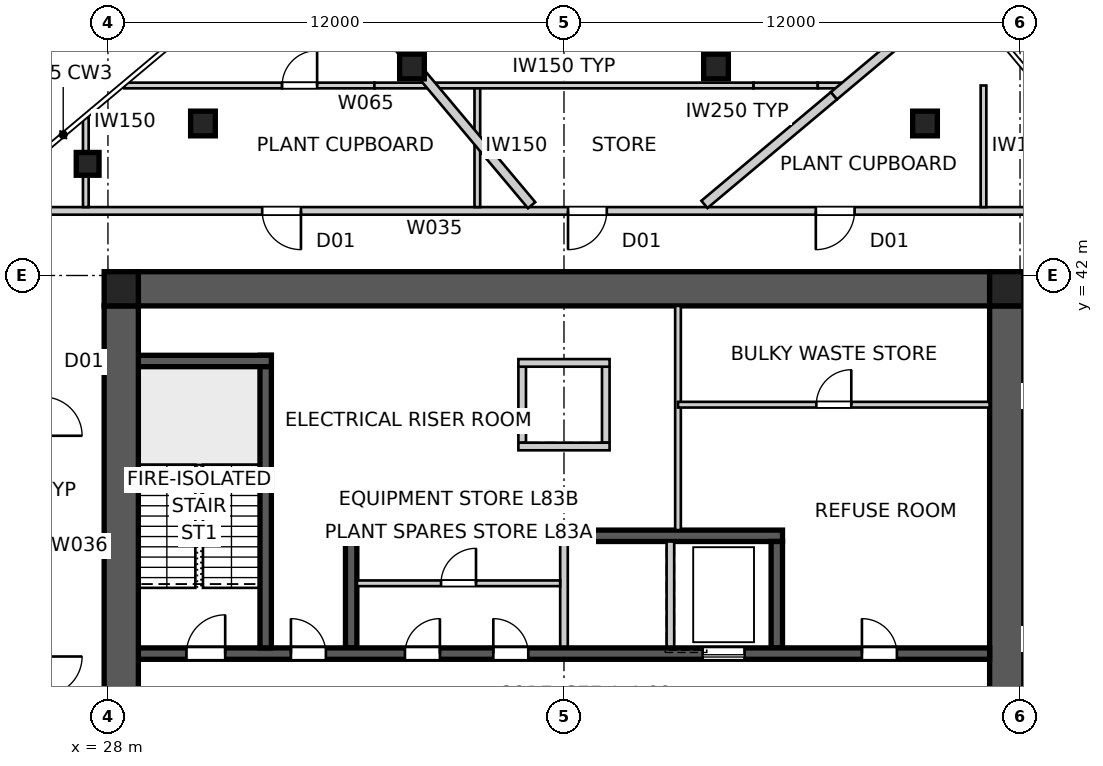
"""IFC4 building model, lengths in metres.
Left out: names, types, materials, properties, quantities, classifications, styles, units other than length and angle.
Written with IfcOpenShell. Run it as: python <this file> out.ifc"""

import sys

from ifc_helpers import new_model, si_unit, direction, frame, frame_2d, origin, origin_2d, place, context, subcontext, project, spatial, polyline, rectangle, outline, extrude, element, fill, save


model = new_model("IFC4")
c1 = context("Model", 3, precision=1e-05, world=origin(), true_north=direction((0.0, 1.0)))
c2 = subcontext(c1, "Body", "Model", "MODEL_VIEW")
j1 = project(units=[si_unit("LENGTHUNIT", "METRE"), si_unit("PLANEANGLEUNIT", "RADIAN")], contexts=[c1])
p1 = place(None, origin())
s1 = spatial("IfcSite", under=j1, at=p1, CompositionType="ELEMENT")
p2 = place(p1, origin())
s2 = spatial("IfcBuilding", under=s1, at=p2, CompositionType="ELEMENT")
p3 = place(p2, frame((0.0, 0.0, 299.8)))
s3 = spatial("IfcBuildingStorey", under=s2, at=p3, CompositionType="ELEMENT", Elevation=299.8)
p4 = place(p3, frame((28.8, 41.65, 0.0), z_axis=(0.0, 0.0, 1.0), x_axis=(1.0, 0.0, 0.0)))
e1 = element("IfcWall", 1, at=p4, inside=s3, PredefinedType="SHEAR", context=c2, shape_type="SweptSolid", body=[
    extrude(outline(polyline([(0.0, -0.45), (22.4, -0.45), (22.4, -0.025), (22.85, -0.025), (22.85, 0.025), (22.4, 0.025), (22.4, 0.45), (0.0, 0.45), (0.0, 0.025), (-0.45, 0.025), (-0.45, -0.025), (0.0, -0.025), (0.0, -0.45)])), origin(), (0.0, 0.0, 1.0), 4.5),
])
p5 = place(p3, frame((51.65, 18.8, 0.0), z_axis=(0.0, 0.0, 1.0), x_axis=(0.0, 1.0, 0.0)))
e2 = element("IfcWall", 2, at=p5, inside=s3, PredefinedType="SHEAR", context=c2, shape_type="SweptSolid", body=[
    extrude(outline(polyline([(0.0, -0.45), (22.4, -0.45), (22.4, -0.025), (22.85, -0.025), (22.85, 0.025), (22.4, 0.025), (22.4, 0.45), (0.0, 0.45), (0.0, 0.025), (-0.45, 0.025), (-0.45, -0.025), (0.0, -0.025), (0.0, -0.45)])), origin(), (0.0, 0.0, 1.0), 4.5),
])
p6 = place(p5, frame((11.14, 0.0, 0.0)))
e3 = element("IfcOpeningElement", 3, at=p6, cuts=e2, PredefinedType="OPENING", context=c2, shape_type="SweptSolid", body=[
    extrude(rectangle(XDim=1.02, YDim=2.4, at=frame_2d((0.51, 1.2))), frame((0.0, 0.46, 0.0), z_axis=(0.0, -1.0, 0.0), x_axis=(1.0, 0.0, 0.0)), (0.0, 0.0, 1.0), 0.92),
])
p7 = place(p3, frame((28.35, 41.2, 0.0), z_axis=(0.0, 0.0, 1.0), x_axis=(0.0, -1.0, 0.0)))
e4 = element("IfcWall", 4, at=p7, inside=s3, PredefinedType="SHEAR", context=c2, shape_type="SweptSolid", body=[
    extrude(outline(polyline([(0.0, -0.45), (22.4, -0.45), (22.4, -0.025), (22.85, -0.025), (22.85, 0.025), (22.4, 0.025), (22.4, 0.45), (0.0, 0.45), (0.0, 0.025), (-0.45, 0.025), (-0.45, -0.025), (0.0, -0.025), (0.0, -0.45)])), origin(), (0.0, 0.0, 1.0), 4.5),
])
p8 = place(p7, frame((11.14, 0.0, 0.0)))
e5 = element("IfcOpeningElement", 5, at=p8, cuts=e4, PredefinedType="OPENING", context=c2, shape_type="SweptSolid", body=[
    extrude(rectangle(XDim=1.02, YDim=2.4, at=frame_2d((0.51, 1.2))), frame((0.0, 0.46, 0.0), z_axis=(0.0, -1.0, 0.0), x_axis=(1.0, 0.0, 0.0)), (0.0, 0.0, 1.0), 0.92),
])
p9 = place(p3, frame((28.8, 32.05, 0.0), z_axis=(0.0, 0.0, 1.0), x_axis=(1.0, 0.0, 0.0)))
e6 = element("IfcWall", 6, at=p9, inside=s3, PredefinedType="SHEAR", context=c2, shape_type="SweptSolid", body=[
    extrude(rectangle(XDim=22.4, YDim=0.3, at=frame_2d((11.2, 0.0))), origin(), (0.0, 0.0, 1.0), 4.5),
])
p10 = place(p9, frame((19.04, 0.0, 0.0)))
e7 = element("IfcOpeningElement", 7, at=p10, cuts=e6, PredefinedType="OPENING", context=c2, shape_type="SweptSolid", body=[
    extrude(rectangle(XDim=0.92, YDim=2.1, at=frame_2d((0.46, 1.05))), frame((0.0, 0.16, 0.0), z_axis=(0.0, -1.0, 0.0), x_axis=(1.0, 0.0, 0.0)), (0.0, 0.0, 1.0), 0.32),
])
p11 = place(p9, frame((1.265, 0.0, 0.0)))
e8 = element("IfcOpeningElement", 8, at=p11, cuts=e6, PredefinedType="OPENING", context=c2, shape_type="SweptSolid", body=[
    extrude(rectangle(XDim=1.02, YDim=2.1, at=frame_2d((0.51, 1.05))), frame((0.0, 0.16, 0.0), z_axis=(0.0, -1.0, 0.0), x_axis=(1.0, 0.0, 0.0)), (0.0, 0.0, 1.0), 0.32),
])
p12 = place(p9, frame((4.015, 0.0, 0.0)))
e9 = element("IfcOpeningElement", 9, at=p12, cuts=e6, PredefinedType="OPENING", context=c2, shape_type="SweptSolid", body=[
    extrude(rectangle(XDim=0.92, YDim=2.1, at=frame_2d((0.46, 1.05))), frame((0.0, 0.16, 0.0), z_axis=(0.0, -1.0, 0.0), x_axis=(1.0, 0.0, 0.0)), (0.0, 0.0, 1.0), 0.32),
])
p13 = place(p9, frame((7.015, 0.0, 0.0)))
e10 = element("IfcOpeningElement", 10, at=p13, cuts=e6, PredefinedType="OPENING", context=c2, shape_type="SweptSolid", body=[
    extrude(rectangle(XDim=0.92, YDim=2.1, at=frame_2d((0.46, 1.05))), frame((0.0, 0.16, 0.0), z_axis=(0.0, -1.0, 0.0), x_axis=(1.0, 0.0, 0.0)), (0.0, 0.0, 1.0), 0.32),
])
p14 = place(p9, frame((9.34, 0.0, 0.0)))
e11 = element("IfcOpeningElement", 11, at=p14, cuts=e6, PredefinedType="OPENING", context=c2, shape_type="SweptSolid", body=[
    extrude(rectangle(XDim=0.92, YDim=2.1, at=frame_2d((0.46, 1.05))), frame((0.0, 0.16, 0.0), z_axis=(0.0, -1.0, 0.0), x_axis=(1.0, 0.0, 0.0)), (0.0, 0.0, 1.0), 0.32),
])
p15 = place(p9, frame((14.85, 0.0, 0.0)))
e12 = element("IfcOpeningElement", 12, at=p15, cuts=e6, PredefinedType="OPENING", context=c2, shape_type="SweptSolid", body=[
    extrude(rectangle(XDim=1.1, YDim=2.1, at=frame_2d((0.55, 1.05))), frame((0.0, 0.16, 0.0), z_axis=(0.0, -1.0, 0.0), x_axis=(1.0, 0.0, 0.0)), (0.0, 0.0, 1.0), 0.32),
])
p16 = place(p3, frame((34.25, 35.15, 0.0), z_axis=(0.0, 0.0, 1.0), x_axis=(1.0, 0.0, 0.0)))
e13 = element("IfcWall", 13, at=p16, inside=s3, PredefinedType="SHEAR", context=c2, shape_type="SweptSolid", body=[
    extrude(rectangle(XDim=11.5, YDim=0.3, at=frame_2d((5.75, 0.0))), origin(), (0.0, 0.0, 1.0), 4.5),
])
p17 = place(p3, frame((34.4, 32.2, 0.0), z_axis=(0.0, 0.0, 1.0), x_axis=(0.0, 1.0, 0.0)))
e14 = element("IfcWall", 14, at=p17, inside=s3, PredefinedType="SHEAR", context=c2, shape_type="SweptSolid", body=[
    extrude(rectangle(XDim=2.8, YDim=0.3, at=frame_2d((1.4, 0.0))), origin(), (0.0, 0.0, 1.0), 4.5),
])
for number, where, z_axis, x_axis in (
    (15, (40.0, 32.2, 0.0), (0.0, 0.0, 1.0), (0.0, 1.0, 0.0)),
    (16, (42.8, 32.2, 0.0), (0.0, 0.0, 1.0), (0.0, 1.0, 0.0)),
):
    element("IfcWall", number, at=place(p3, frame(where, z_axis=z_axis, x_axis=x_axis)), inside=s3, PredefinedType="SOLIDWALL", context=c2, shape_type="SweptSolid", body=[
        extrude(rectangle(XDim=2.8, YDim=0.2, at=frame_2d((1.4, 0.0))), origin(), (0.0, 0.0, 1.0), 4.5),
    ])
p18 = place(p3, frame((45.6, 32.2, 0.0), z_axis=(0.0, 0.0, 1.0), x_axis=(0.0, 1.0, 0.0)))
e17 = element("IfcWall", 17, at=p18, inside=s3, PredefinedType="SHEAR", context=c2, shape_type="SweptSolid", body=[
    extrude(rectangle(XDim=2.8, YDim=0.3, at=frame_2d((1.4, 0.0))), origin(), (0.0, 0.0, 1.0), 4.5),
])
p19 = place(p3, frame((32.15, 32.2, 0.0), z_axis=(0.0, 0.0, 1.0), x_axis=(0.0, 1.0, 0.0)))
e18 = element("IfcWall", 18, at=p19, inside=s3, PredefinedType="SHEAR", context=c2, shape_type="SweptSolid", body=[
    extrude(rectangle(XDim=7.7, YDim=0.3, at=frame_2d((3.85, 0.0))), origin(), (0.0, 0.0, 1.0), 4.5),
])
p20 = place(p3, frame((28.8, 39.75, 0.0), z_axis=(0.0, 0.0, 1.0), x_axis=(1.0, 0.0, 0.0)))
e19 = element("IfcWall", 19, at=p20, inside=s3, PredefinedType="SHEAR", context=c2, shape_type="SweptSolid", body=[
    extrude(rectangle(XDim=3.5, YDim=0.3, at=frame_2d((1.75, 0.0))), origin(), (0.0, 0.0, 1.0), 4.5),
])
for number, where, z_axis, x_axis in (
    (20, (38.9, 37.6, 0.0), (0.0, 0.0, 1.0), (0.0, 1.0, 0.0)),
    (21, (41.1, 37.6, 0.0), (0.0, 0.0, 1.0), (0.0, 1.0, 0.0)),
):
    element("IfcWall", number, at=place(p3, frame(where, z_axis=z_axis, x_axis=x_axis)), inside=s3, PredefinedType="SOLIDWALL", context=c2, shape_type="SweptSolid", body=[
        extrude(rectangle(XDim=2.0, YDim=0.2, at=frame_2d((1.0, 0.0))), origin(), (0.0, 0.0, 1.0), 4.5),
    ])
for number, where, z_axis, x_axis in (
    (22, (38.8, 37.5, 0.0), (0.0, 0.0, 1.0), (1.0, 0.0, 0.0)),
    (23, (38.8, 39.7, 0.0), (0.0, 0.0, 1.0), (1.0, 0.0, 0.0)),
):
    element("IfcWall", number, at=place(p3, frame(where, z_axis=z_axis, x_axis=x_axis)), inside=s3, PredefinedType="SOLIDWALL", context=c2, shape_type="SweptSolid", body=[
        extrude(rectangle(XDim=2.4, YDim=0.2, at=frame_2d((1.2, 0.0))), origin(), (0.0, 0.0, 1.0), 4.5),
    ])
for number, where, z_axis, x_axis in (
    (24, (51.65, 41.65, 0.0), (0.0, 0.0, 1.0), (1.0, 0.0, 0.0)),
    (25, (28.35, 41.65, 0.0), (0.0, 0.0, 1.0), (1.0, 0.0, 0.0)),
):
    element("IfcColumn", number, at=place(p3, frame(where, z_axis=z_axis, x_axis=x_axis)), inside=s3, PredefinedType="COLUMN", context=c2, shape_type="SweptSolid", body=[
        extrude(rectangle(XDim=0.9, YDim=0.9, at=origin_2d()), origin(), (0.0, 0.0, 1.0), 4.5),
    ])
p21 = place(p3, frame((27.466, 44.938, 0.0), z_axis=(0.0, 0.0, 1.0), x_axis=(1.0, 0.0, 0.0)))
e26 = element("IfcColumn", 26, at=p21, inside=s3, PredefinedType="COLUMN", context=c2, shape_type="SweptSolid", body=[
    extrude(rectangle(XDim=0.6, YDim=0.6, at=origin_2d()), origin(), (0.0, 0.0, 1.0), 4.5),
])
for number, where, z_axis, x_axis in (
    (27, (49.5, 46.0, 0.0), (0.0, 0.0, 1.0), (1.0, 0.0, 0.0)),
    (28, (44.0, 47.5, 0.0), (0.0, 0.0, 1.0), (1.0, 0.0, 0.0)),
    (29, (36.0, 47.5, 0.0), (0.0, 0.0, 1.0), (1.0, 0.0, 0.0)),
    (30, (30.5, 46.0, 0.0), (0.0, 0.0, 1.0), (1.0, 0.0, 0.0)),
):
    element("IfcColumn", number, at=place(p3, frame(where, z_axis=z_axis, x_axis=x_axis)), inside=s3, PredefinedType="COLUMN", context=c2, shape_type="SweptSolid", body=[
        extrude(rectangle(XDim=0.65, YDim=0.65, at=origin_2d()), origin(), (0.0, 0.0, 1.0), 4.5),
    ])
p22 = place(p3, frame((53.7, 43.7, 0.0), z_axis=(0.0, 0.0, 1.0), x_axis=(-1.0, 0.0, 0.0)))
e31 = element("IfcWall", 31, at=p22, inside=s3, PredefinedType="PARTITIONING", context=c2, shape_type="SweptSolid", body=[
    extrude(rectangle(XDim=27.4, YDim=0.2, at=frame_2d((13.7, 0.0))), origin(), (0.0, 0.0, 1.0), 4.3),
])
p23 = place(p22, frame((20.621, 0.0, 0.0)))
e32 = element("IfcOpeningElement", 32, at=p23, cuts=e31, PredefinedType="OPENING", context=c2, shape_type="SweptSolid", body=[
    extrude(rectangle(XDim=1.02, YDim=2.34, at=frame_2d((0.51, 1.17))), frame((0.0, 0.11, 0.0), z_axis=(0.0, -1.0, 0.0), x_axis=(1.0, 0.0, 0.0)), (0.0, 0.0, 1.0), 0.22),
])
p24 = place(p22, frame((6.053, 0.0, 0.0)))
e33 = element("IfcOpeningElement", 33, at=p24, cuts=e31, PredefinedType="OPENING", context=c2, shape_type="SweptSolid", body=[
    extrude(rectangle(XDim=1.02, YDim=2.34, at=frame_2d((0.51, 1.17))), frame((0.0, 0.11, 0.0), z_axis=(0.0, -1.0, 0.0), x_axis=(1.0, 0.0, 0.0)), (0.0, 0.0, 1.0), 0.22),
])
p25 = place(p22, frame((12.574, 0.0, 0.0)))
e34 = element("IfcOpeningElement", 34, at=p25, cuts=e31, PredefinedType="OPENING", context=c2, shape_type="SweptSolid", body=[
    extrude(rectangle(XDim=1.02, YDim=2.34, at=frame_2d((0.51, 1.17))), frame((0.0, 0.11, 0.0), z_axis=(0.0, -1.0, 0.0), x_axis=(1.0, 0.0, 0.0)), (0.0, 0.0, 1.0), 0.22),
])
p26 = place(p3, frame((49.635, 48.854, 0.0), z_axis=(0.0, 0.0, 1.0), x_axis=(-0.766014492995, -0.642823301165, 0.0)))
e35 = element("IfcWall", 35, at=p26, inside=s3, PredefinedType="PARTITIONING", context=c2, shape_type="SweptSolid", body=[
    extrude(rectangle(XDim=3.308, YDim=0.25, at=frame_2d((1.654, 0.0))), origin(), (0.0, 0.0, 1.0), 3.688),
])
p27 = place(p3, frame((47.101, 46.728, 0.0), z_axis=(0.0, 0.0, 1.0), x_axis=(-0.766051985436, -0.642778620996, 0.0)))
e36 = element("IfcWall", 36, at=p27, inside=s3, PredefinedType="PARTITIONING", context=c2, shape_type="SweptSolid", body=[
    extrude(rectangle(XDim=4.446, YDim=0.25, at=frame_2d((2.223, 0.0))), origin(), (0.0, 0.0, 1.0), 4.3),
])
p28 = place(p3, frame((33.143, 51.007, 0.0), z_axis=(0.0, 0.0, 1.0), x_axis=(0.64278692291, -0.766045019392, 0.0)))
e37 = element("IfcWall", 37, at=p28, inside=s3, PredefinedType="PARTITIONING", context=c2, shape_type="SweptSolid", body=[
    extrude(rectangle(XDim=9.343, YDim=0.25, at=frame_2d((4.671, 0.0))), origin(), (0.0, 0.0, 1.0), 4.3),
])
p29 = place(p3, frame((43.0, 41.2, 0.0), z_axis=(0.0, 0.0, 1.0), x_axis=(0.0, -1.0, 0.0)))
e38 = element("IfcWall", 38, at=p29, inside=s3, PredefinedType="SOLIDWALL", context=c2, shape_type="SweptSolid", body=[
    extrude(rectangle(XDim=5.9, YDim=0.15, at=frame_2d((2.95, 0.0))), origin(), (0.0, 0.0, 1.0), 4.3),
])
p30 = place(p3, frame((43.0, 38.6, 0.0), z_axis=(0.0, 0.0, 1.0), x_axis=(1.0, 0.0, 0.0)))
e39 = element("IfcWall", 39, at=p30, inside=s3, PredefinedType="SOLIDWALL", context=c2, shape_type="SweptSolid", body=[
    extrude(rectangle(XDim=8.2, YDim=0.15, at=frame_2d((4.1, 0.0))), origin(), (0.0, 0.0, 1.0), 4.3),
])
p31 = place(p30, frame((3.64, 0.0, 0.0)))
e40 = element("IfcOpeningElement", 40, at=p31, cuts=e39, PredefinedType="OPENING", context=c2, shape_type="SweptSolid", body=[
    extrude(rectangle(XDim=0.92, YDim=2.1, at=frame_2d((0.46, 1.05))), frame((0.0, 0.085, 0.0), z_axis=(0.0, -1.0, 0.0), x_axis=(1.0, 0.0, 0.0)), (0.0, 0.0, 1.0), 0.17),
])
p32 = place(p3, frame((51.039, 43.8, 0.0), z_axis=(0.0, 0.0, 1.0), x_axis=(0.0, 1.0, 0.0)))
e41 = element("IfcWall", 41, at=p32, inside=s3, PredefinedType="SOLIDWALL", context=c2, shape_type="SweptSolid", body=[
    extrude(rectangle(XDim=3.2, YDim=0.15, at=frame_2d((1.6, 0.0))), origin(), (0.0, 0.0, 1.0), 4.3),
])
p33 = place(p3, frame((27.417, 46.15, 0.0), z_axis=(0.0, 0.0, 1.0), x_axis=(0.0, -1.0, 0.0)))
e42 = element("IfcWall", 42, at=p33, inside=s3, PredefinedType="SOLIDWALL", context=c2, shape_type="SweptSolid", body=[
    extrude(rectangle(XDim=2.35, YDim=0.15, at=frame_2d((1.175, 0.0))), origin(), (0.0, 0.0, 1.0), 4.3),
])
p34 = place(p3, frame((37.72, 47.0, 0.0), z_axis=(0.0, 0.0, 1.0), x_axis=(0.0, -1.0, 0.0)))
e43 = element("IfcWall", 43, at=p34, inside=s3, PredefinedType="SOLIDWALL", context=c2, shape_type="SweptSolid", body=[
    extrude(rectangle(XDim=3.2, YDim=0.15, at=frame_2d((1.6, 0.0))), origin(), (0.0, 0.0, 1.0), 4.3),
])
p35 = place(p3, frame((28.43, 47.0, 0.0), z_axis=(0.0, 0.0, 1.0), x_axis=(1.0, 0.0, 0.0)))
e44 = element("IfcWall", 44, at=p35, inside=s3, PredefinedType="SOLIDWALL", context=c2, shape_type="SweptSolid", body=[
    extrude(rectangle(XDim=4.154, YDim=0.15, at=frame_2d((2.077, 0.0))), origin(), (0.0, 0.0, 1.0), 4.3),
])
p36 = place(p3, frame((32.584, 47.0, 0.0), z_axis=(0.0, 0.0, 1.0), x_axis=(1.0, 0.0, 0.0)))
e45 = element("IfcWall", 45, at=p36, inside=s3, PredefinedType="SOLIDWALL", context=c2, shape_type="SweptSolid", body=[
    extrude(rectangle(XDim=2.428, YDim=0.15, at=frame_2d((1.214, 0.0))), origin(), (0.0, 0.0, 1.0), 3.3),
])
p37 = place(p36, origin())
e46 = element("IfcOpeningElement", 46, at=p37, cuts=e45, PredefinedType="OPENING", context=c2, shape_type="SweptSolid", body=[
    extrude(rectangle(XDim=0.92, YDim=2.1, at=frame_2d((0.46, 1.05))), frame((0.0, 0.085, 0.0), z_axis=(0.0, -1.0, 0.0), x_axis=(1.0, 0.0, 0.0)), (0.0, 0.0, 1.0), 0.17),
])
p38 = place(p3, frame((35.012, 47.0, 0.0), z_axis=(0.0, 0.0, 1.0), x_axis=(1.0, 0.0, 0.0)))
e47 = element("IfcWall", 47, at=p38, inside=s3, PredefinedType="SOLIDWALL", context=c2, shape_type="SweptSolid", body=[
    extrude(rectangle(XDim=9.977, YDim=0.15, at=frame_2d((4.988, 0.0))), origin(), (0.0, 0.0, 1.0), 4.3),
])
p39 = place(p3, frame((44.988, 47.0, 0.0), z_axis=(0.0, 0.0, 1.0), x_axis=(1.0, 0.0, 0.0)))
e48 = element("IfcWall", 48, at=p39, inside=s3, PredefinedType="SOLIDWALL", context=c2, shape_type="SweptSolid", body=[
    extrude(rectangle(XDim=1.69, YDim=0.15, at=frame_2d((0.845, 0.0))), origin(), (0.0, 0.0, 1.0), 3.3),
])
p40 = place(p3, frame((46.678, 47.0, 0.0), z_axis=(0.0, 0.0, 1.0), x_axis=(1.0, 0.0, 0.0)))
e49 = element("IfcWall", 49, at=p40, inside=s3, PredefinedType="SOLIDWALL", context=c2, shape_type="SweptSolid", body=[
    extrude(rectangle(XDim=0.747, YDim=0.15, at=frame_2d((0.373, 0.0))), origin(), (0.0, 0.0, 1.0), 4.3),
])
p41 = place(p3, frame((34.55, 33.9, 0.0), z_axis=(0.0, 0.0, 1.0), x_axis=(1.0, 0.0, 0.0)))
e50 = element("IfcWall", 50, at=p41, inside=s3, PredefinedType="SOLIDWALL", context=c2, shape_type="SweptSolid", body=[
    extrude(rectangle(XDim=5.35, YDim=0.15, at=frame_2d((2.675, 0.0))), origin(), (0.0, 0.0, 1.0), 4.3),
])
p42 = place(p41, frame((2.215, 0.0, 0.0)))
e51 = element("IfcOpeningElement", 51, at=p42, cuts=e50, PredefinedType="OPENING", context=c2, shape_type="SweptSolid", body=[
    extrude(rectangle(XDim=0.92, YDim=2.1, at=frame_2d((0.46, 1.05))), frame((0.0, 0.085, 0.0), z_axis=(0.0, -1.0, 0.0), x_axis=(1.0, 0.0, 0.0)), (0.0, 0.0, 1.0), 0.17),
])
p43 = place(p10, origin())
e52 = element("IfcDoor", 52, at=p43, inside=s3, OperationType="SINGLE_SWING_LEFT", PredefinedType="DOOR", context=c2, shape_type="SweptSolid", body=[
    extrude(rectangle(XDim=0.92, YDim=2.1, at=frame_2d((0.46, 1.05))), frame((0.0, 0.025, 0.0), z_axis=(0.0, -1.0, 0.0), x_axis=(1.0, 0.0, 0.0)), (0.0, 0.0, 1.0), 0.05),
])
fill(e7, e52)
p44 = place(p11, origin())
e53 = element("IfcDoor", 53, at=p44, inside=s3, OperationType="SINGLE_SWING_RIGHT", PredefinedType="DOOR", context=c2, shape_type="SweptSolid", body=[
    extrude(rectangle(XDim=1.02, YDim=2.1, at=frame_2d((0.51, 1.05))), frame((0.0, 0.025, 0.0), z_axis=(0.0, -1.0, 0.0), x_axis=(1.0, 0.0, 0.0)), (0.0, 0.0, 1.0), 0.05),
])
fill(e8, e53)
p45 = place(p12, origin())
e54 = element("IfcDoor", 54, at=p45, inside=s3, OperationType="SINGLE_SWING_LEFT", PredefinedType="DOOR", context=c2, shape_type="SweptSolid", body=[
    extrude(rectangle(XDim=0.92, YDim=2.1, at=frame_2d((0.46, 1.05))), frame((0.0, 0.025, 0.0), z_axis=(0.0, -1.0, 0.0), x_axis=(1.0, 0.0, 0.0)), (0.0, 0.0, 1.0), 0.05),
])
fill(e9, e54)
p46 = place(p23, origin())
e55 = element("IfcDoor", 55, at=p46, inside=s3, OperationType="SINGLE_SWING_LEFT", PredefinedType="DOOR", context=c2, shape_type="SweptSolid", body=[
    extrude(rectangle(XDim=1.02, YDim=2.34, at=frame_2d((0.51, 1.17))), frame((0.0, 0.025, 0.0), z_axis=(0.0, -1.0, 0.0), x_axis=(1.0, 0.0, 0.0)), (0.0, 0.0, 1.0), 0.05),
])
fill(e32, e55)
p47 = place(p24, origin())
e56 = element("IfcDoor", 56, at=p47, inside=s3, OperationType="SINGLE_SWING_RIGHT", PredefinedType="DOOR", context=c2, shape_type="SweptSolid", body=[
    extrude(rectangle(XDim=1.02, YDim=2.34, at=frame_2d((0.51, 1.17))), frame((0.0, 0.025, 0.0), z_axis=(0.0, -1.0, 0.0), x_axis=(1.0, 0.0, 0.0)), (0.0, 0.0, 1.0), 0.05),
])
fill(e33, e56)
p48 = place(p25, origin())
e57 = element("IfcDoor", 57, at=p48, inside=s3, OperationType="SINGLE_SWING_RIGHT", PredefinedType="DOOR", context=c2, shape_type="SweptSolid", body=[
    extrude(rectangle(XDim=1.02, YDim=2.34, at=frame_2d((0.51, 1.17))), frame((0.0, 0.025, 0.0), z_axis=(0.0, -1.0, 0.0), x_axis=(1.0, 0.0, 0.0)), (0.0, 0.0, 1.0), 0.05),
])
fill(e34, e57)
p49 = place(p31, origin())
e58 = element("IfcDoor", 58, at=p49, inside=s3, OperationType="SINGLE_SWING_RIGHT", PredefinedType="DOOR", context=c2, shape_type="SweptSolid", body=[
    extrude(rectangle(XDim=0.92, YDim=2.1, at=frame_2d((0.46, 1.05))), frame((0.0, 0.025, 0.0), z_axis=(0.0, -1.0, 0.0), x_axis=(1.0, 0.0, 0.0)), (0.0, 0.0, 1.0), 0.05),
])
fill(e40, e58)
p50 = place(p37, origin())
e59 = element("IfcDoor", 59, at=p50, inside=s3, OperationType="SINGLE_SWING_RIGHT", PredefinedType="DOOR", context=c2, shape_type="SweptSolid", body=[
    extrude(rectangle(XDim=0.92, YDim=2.1, at=frame_2d((0.46, 1.05))), frame((0.0, 0.025, 0.0), z_axis=(0.0, -1.0, 0.0), x_axis=(1.0, 0.0, 0.0)), (0.0, 0.0, 1.0), 0.05),
])
fill(e46, e59)
p51 = place(p13, origin())
e60 = element("IfcDoor", 60, at=p51, inside=s3, OperationType="SINGLE_SWING_RIGHT", PredefinedType="DOOR", context=c2, shape_type="SweptSolid", body=[
    extrude(rectangle(XDim=0.92, YDim=2.1, at=frame_2d((0.46, 1.05))), frame((0.0, 0.025, 0.0), z_axis=(0.0, -1.0, 0.0), x_axis=(1.0, 0.0, 0.0)), (0.0, 0.0, 1.0), 0.05),
])
fill(e10, e60)
p52 = place(p14, origin())
e61 = element("IfcDoor", 61, at=p52, inside=s3, OperationType="SINGLE_SWING_LEFT", PredefinedType="DOOR", context=c2, shape_type="SweptSolid", body=[
    extrude(rectangle(XDim=0.92, YDim=2.1, at=frame_2d((0.46, 1.05))), frame((0.0, 0.025, 0.0), z_axis=(0.0, -1.0, 0.0), x_axis=(1.0, 0.0, 0.0)), (0.0, 0.0, 1.0), 0.05),
])
fill(e11, e61)
p53 = place(p42, origin())
e62 = element("IfcDoor", 62, at=p53, inside=s3, OperationType="SINGLE_SWING_RIGHT", PredefinedType="DOOR", context=c2, shape_type="SweptSolid", body=[
    extrude(rectangle(XDim=0.92, YDim=2.1, at=frame_2d((0.46, 1.05))), frame((0.0, 0.025, 0.0), z_axis=(0.0, -1.0, 0.0), x_axis=(1.0, 0.0, 0.0)), (0.0, 0.0, 1.0), 0.05),
])
fill(e51, e62)
p54 = place(p15, origin())
e63 = element("IfcDoor", 63, at=p54, inside=s3, OperationType="SLIDING_TO_LEFT", PredefinedType="DOOR", context=c2, shape_type="SweptSolid", body=[
    extrude(rectangle(XDim=1.1, YDim=2.1, at=frame_2d((0.55, 1.05))), frame((0.0, 0.025, 0.0), z_axis=(0.0, -1.0, 0.0), x_axis=(1.0, 0.0, 0.0)), (0.0, 0.0, 1.0), 0.05),
])
fill(e12, e63)
save(model, sys.argv[1])
